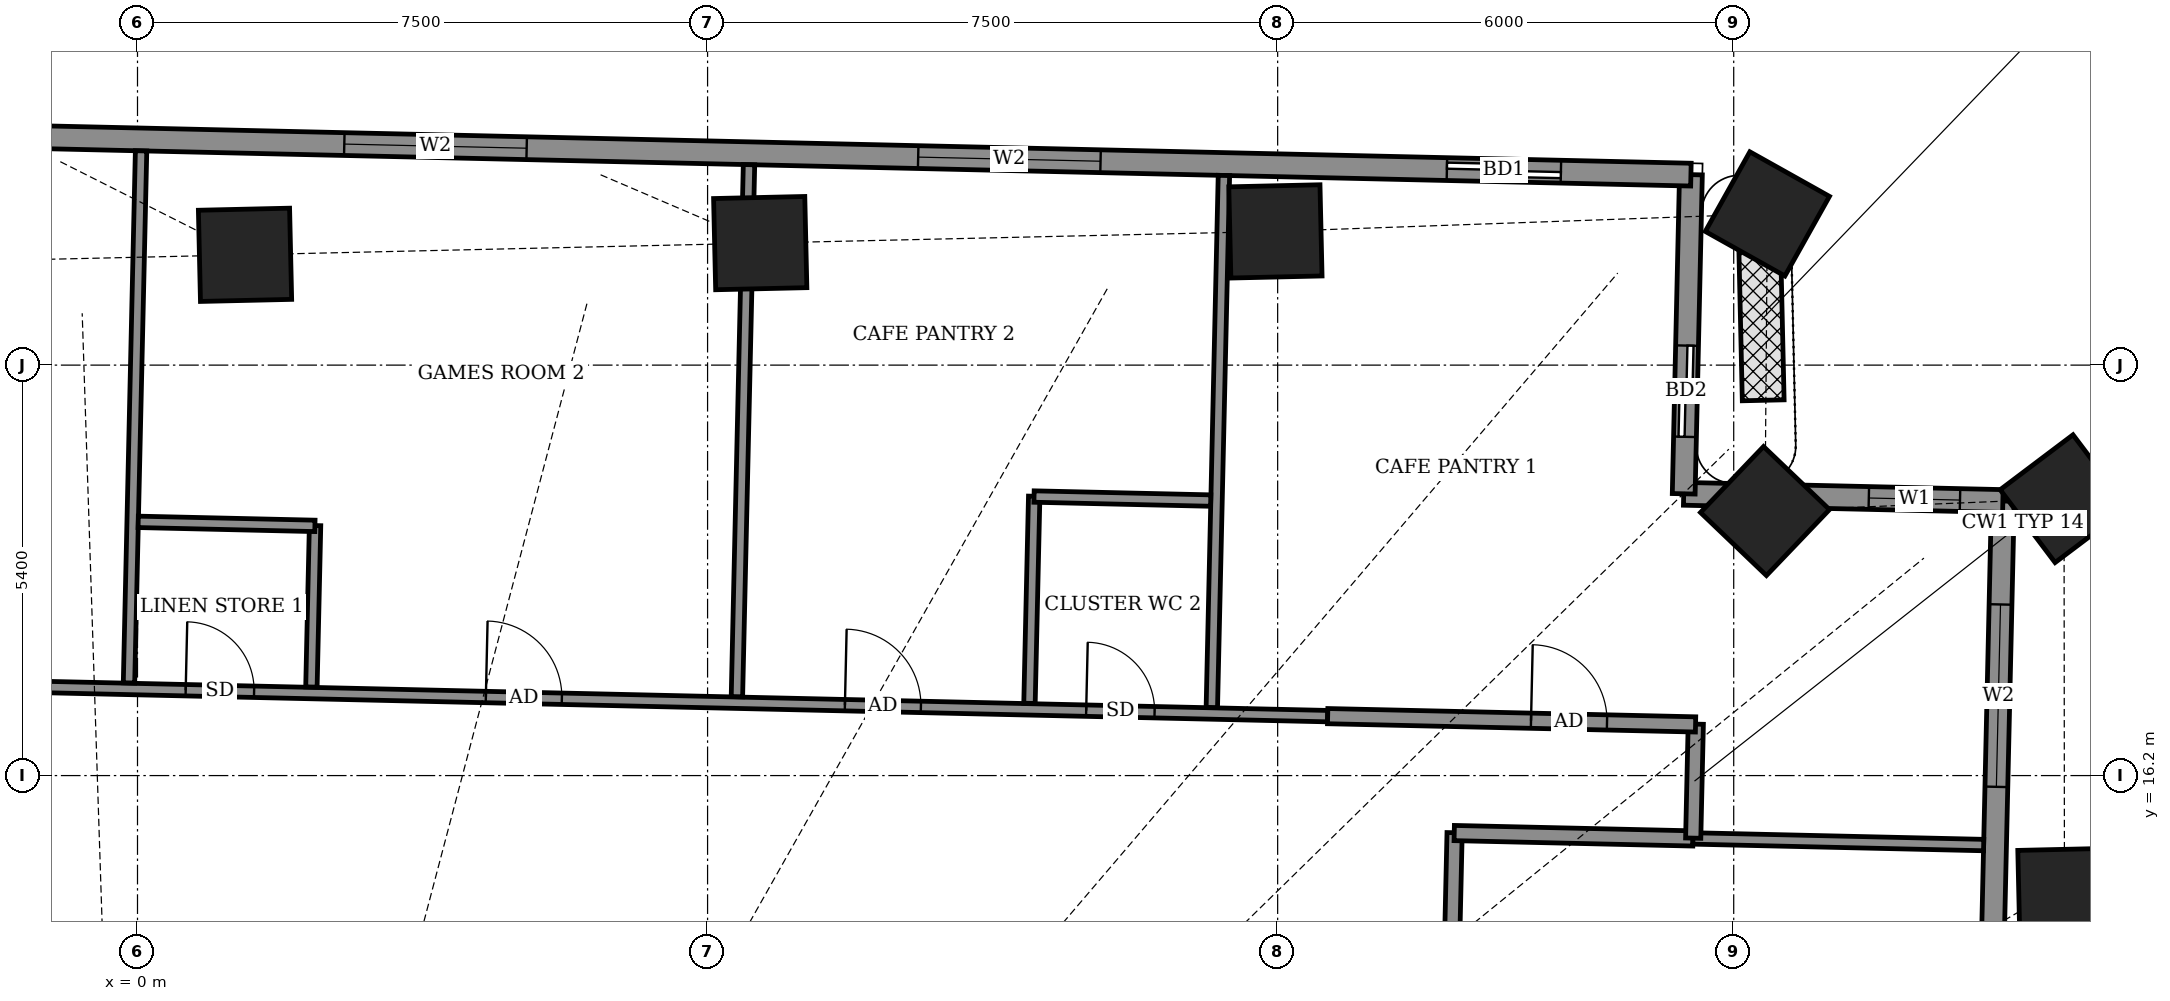
"""IFC4 building model, lengths in metres.
Left out: names, types, materials, properties, quantities, classifications, styles, units other than length and angle.
Written with IfcOpenShell. Run it as: python <this file> out.ifc"""

import sys

from ifc_helpers import new_model, si_unit, direction, frame, frame_2d, origin, origin_2d, place, context, subcontext, project, spatial, rectangle, extrude, element, fill, save


model = new_model("IFC4")
c1 = context("Model", 3, precision=1e-05, world=origin(), true_north=direction((0.0, 1.0)))
c2 = subcontext(c1, "Body", "Model", "MODEL_VIEW")
j1 = project(units=[si_unit("LENGTHUNIT", "METRE"), si_unit("PLANEANGLEUNIT", "RADIAN")], contexts=[c1])
p1 = place(None, origin())
s1 = spatial("IfcSite", under=j1, at=p1, CompositionType="ELEMENT")
p2 = place(p1, origin())
s2 = spatial("IfcBuilding", under=s1, at=p2, CompositionType="ELEMENT")
p3 = place(p2, frame((0.0, 0.0, 193.3)))
s3 = spatial("IfcBuildingStorey", under=s2, at=p3, CompositionType="ELEMENT", Elevation=193.3)
for number, where, z_axis, x_axis in (
    (1, (25.351, 14.629, -0.55), (0.0, 0.0, 1.0), (-0.023, 1.0, 0.0)),
    (2, (25.346, 19.843, -0.55), (0.0, 0.0, 1.0), (-0.602, 0.798, 0.0)),
    (3, (21.411, 19.68, -0.55), (0.0, 0.0, 1.0), (-0.723, 0.691, 0.0)),
    (4, (21.443, 23.589, -0.55), (0.0, 0.0, 1.0), (-0.873, 0.488, 0.0)),
    (5, (14.971, 23.359, -0.55), (0.0, 0.0, 1.0), (-1.0, -0.023, 0.0)),
    (6, (8.193, 23.205, -0.55), (0.0, 0.0, 1.0), (-1.0, -0.023, 0.0)),
    (7, (1.415, 23.051, -0.55), (0.0, 0.0, 1.0), (-1.0, -0.023, 0.0)),
):
    element("IfcColumn", number, at=place(p3, frame(where, z_axis=z_axis, x_axis=x_axis)), inside=s3, PredefinedType="COLUMN", context=c2, shape_type="SweptSolid", body=[
        extrude(rectangle(XDim=1.2, YDim=1.2, at=origin_2d()), origin(), (0.0, 0.0, 1.0), 4.6),
    ])
p4 = place(p3, frame((24.27, 7.885, 0.0), z_axis=(0.0, 0.0, 1.0), x_axis=(0.022715362207, 0.999741972871, 0.0)))
e8 = element("IfcWall", 8, at=p4, inside=s3, PredefinedType="SOLIDWALL", context=c2, shape_type="SweptSolid", body=[
    extrude(rectangle(XDim=11.93, YDim=0.3, at=frame_2d((5.965, 0.0))), origin(), (0.0, 0.0, 1.0), 2.65),
])
p5 = place(p4, frame((3.239, 0.0, 0.0)))
e9 = element("IfcOpeningElement", 9, at=p5, cuts=e8, PredefinedType="OPENING", context=c2, shape_type="SweptSolid", body=[
    extrude(rectangle(XDim=1.5, YDim=2.4, at=frame_2d((0.75, 1.2))), frame((0.0, 0.16, 0.0), z_axis=(0.0, -1.0, 0.0), x_axis=(1.0, 0.0, 0.0)), (0.0, 0.0, 1.0), 0.32),
])
p6 = place(p4, frame((8.169, 0.0, 0.9)))
e10 = element("IfcOpeningElement", 10, at=p6, cuts=e8, PredefinedType="OPENING", context=c2, shape_type="SweptSolid", body=[
    extrude(rectangle(XDim=2.4, YDim=1.5, at=frame_2d((1.2, 0.75))), frame((0.0, 0.16, 0.0), z_axis=(0.0, -1.0, 0.0), x_axis=(1.0, 0.0, 0.0)), (0.0, 0.0, 1.0), 0.32),
])
p7 = place(p3, frame((24.541, 19.812, 0.0), z_axis=(0.0, 0.0, 1.0), x_axis=(-0.999744320311, 0.022611811187, 0.0)))
e11 = element("IfcWall", 11, at=p7, inside=s3, PredefinedType="SOLIDWALL", context=c2, shape_type="SweptSolid", body=[
    extrude(rectangle(XDim=4.2, YDim=0.3, at=frame_2d((2.1, 0.0))), origin(), (0.0, 0.0, 1.0), 2.65),
])
p8 = place(p7, frame((0.564, 0.0, 0.9)))
e12 = element("IfcOpeningElement", 12, at=p8, cuts=e11, PredefinedType="OPENING", context=c2, shape_type="SweptSolid", body=[
    extrude(rectangle(XDim=1.2, YDim=1.5, at=frame_2d((0.6, 0.75))), frame((0.0, 0.16, 0.0), z_axis=(0.0, -1.0, 0.0), x_axis=(1.0, 0.0, 0.0)), (0.0, 0.0, 1.0), 0.32),
])
p9 = place(p3, frame((20.342, 19.907, 0.0), z_axis=(0.0, 0.0, 1.0), x_axis=(0.022611811187, 0.999744320311, 0.0)))
e13 = element("IfcWall", 13, at=p9, inside=s3, PredefinedType="SOLIDWALL", context=c2, shape_type="SweptSolid", body=[
    extrude(rectangle(XDim=4.2, YDim=0.3, at=frame_2d((2.1, 0.0))), origin(), (0.0, 0.0, 1.0), 2.65),
])
p10 = place(p9, frame((0.75, 0.0, 0.0)))
e14 = element("IfcOpeningElement", 14, at=p10, cuts=e13, PredefinedType="OPENING", context=c2, shape_type="SweptSolid", body=[
    extrude(rectangle(XDim=1.2, YDim=2.4, at=frame_2d((0.6, 1.2))), frame((0.0, 0.16, 0.0), z_axis=(0.0, -1.0, 0.0), x_axis=(1.0, 0.0, 0.0)), (0.0, 0.0, 1.0), 0.32),
])
p11 = place(p3, frame((20.437, 24.106, 0.0), z_axis=(0.0, 0.0, 1.0), x_axis=(-0.999742506232, 0.022691875925, 0.0)))
e15 = element("IfcWall", 15, at=p11, inside=s3, PredefinedType="SOLIDWALL", context=c2, shape_type="SweptSolid", body=[
    extrude(rectangle(XDim=42.444, YDim=0.3, at=frame_2d((21.222, 0.0))), origin(), (0.0, 0.0, 1.0), 2.65),
])
p12 = place(p11, frame((1.711, 0.0, 0.0)))
e16 = element("IfcOpeningElement", 16, at=p12, cuts=e15, PredefinedType="OPENING", context=c2, shape_type="SweptSolid", body=[
    extrude(rectangle(XDim=1.5, YDim=2.4, at=frame_2d((0.75, 1.2))), frame((0.0, 0.16, 0.0), z_axis=(0.0, -1.0, 0.0), x_axis=(1.0, 0.0, 0.0)), (0.0, 0.0, 1.0), 0.32),
])
p13 = place(p11, frame((7.769, 0.0, 0.9)))
e17 = element("IfcOpeningElement", 17, at=p13, cuts=e15, PredefinedType="OPENING", context=c2, shape_type="SweptSolid", body=[
    extrude(rectangle(XDim=2.4, YDim=1.5, at=frame_2d((1.2, 0.75))), frame((0.0, 0.16, 0.0), z_axis=(0.0, -1.0, 0.0), x_axis=(1.0, 0.0, 0.0)), (0.0, 0.0, 1.0), 0.32),
])
p14 = place(p11, frame((15.321, 0.0, 0.9)))
e18 = element("IfcOpeningElement", 18, at=p14, cuts=e15, PredefinedType="OPENING", context=c2, shape_type="SweptSolid", body=[
    extrude(rectangle(XDim=2.4, YDim=1.5, at=frame_2d((1.2, 0.75))), frame((0.0, 0.16, 0.0), z_axis=(0.0, -1.0, 0.0), x_axis=(1.0, 0.0, 0.0)), (0.0, 0.0, 1.0), 0.32),
])
p15 = place(p11, frame((22.142, 0.0, 0.0)))
e19 = element("IfcOpeningElement", 19, at=p15, cuts=e15, PredefinedType="OPENING", context=c2, shape_type="SweptSolid", body=[
    extrude(rectangle(XDim=1.5, YDim=2.4, at=frame_2d((0.75, 1.2))), frame((0.0, 0.16, 0.0), z_axis=(0.0, -1.0, 0.0), x_axis=(1.0, 0.0, 0.0)), (0.0, 0.0, 1.0), 0.32),
])
p16 = place(p11, frame((29.444, 0.0, 0.9)))
e20 = element("IfcOpeningElement", 20, at=p16, cuts=e15, PredefinedType="OPENING", context=c2, shape_type="SweptSolid", body=[
    extrude(rectangle(XDim=2.4, YDim=1.5, at=frame_2d((1.2, 0.75))), frame((0.0, 0.16, 0.0), z_axis=(0.0, -1.0, 0.0), x_axis=(1.0, 0.0, 0.0)), (0.0, 0.0, 1.0), 0.32),
])
p17 = place(p11, frame((37.419, 0.0, 0.9)))
e21 = element("IfcOpeningElement", 21, at=p17, cuts=e15, PredefinedType="OPENING", context=c2, shape_type="SweptSolid", body=[
    extrude(rectangle(XDim=2.4, YDim=1.5, at=frame_2d((1.2, 0.75))), frame((0.0, 0.16, 0.0), z_axis=(0.0, -1.0, 0.0), x_axis=(1.0, 0.0, 0.0)), (0.0, 0.0, 1.0), 0.32),
])
p18 = place(p3, frame((21.34, 23.253, 0.0), z_axis=(0.0, 0.0, 1.0), x_axis=(0.022608734328, -0.999744389898, 0.0)))
e22 = element("IfcWall", 22, at=p18, inside=s3, PredefinedType="USERDEFINED", context=c2, shape_type="SweptSolid", body=[
    extrude(rectangle(XDim=2.116, YDim=0.55, at=frame_2d((1.058, 0.0))), origin(), (0.0, 0.0, 1.0), 0.8),
])
p19 = place(p3, frame((17.154, 7.786, 0.0), z_axis=(0.0, 0.0, 1.0), x_axis=(0.022680883318, 0.999742755679, 0.0)))
e23 = element("IfcWall", 23, at=p19, inside=s3, PredefinedType="PARTITIONING", context=c2, shape_type="SweptSolid", body=[
    extrude(rectangle(XDim=7.664, YDim=0.2, at=frame_2d((3.832, 0.0))), origin(), (0.0, 0.0, 1.0), 2.75),
])
p20 = place(p19, frame((3.434, 0.0, 0.0)))
e24 = element("IfcOpeningElement", 24, at=p20, cuts=e23, PredefinedType="OPENING", context=c2, shape_type="SweptSolid", body=[
    extrude(rectangle(XDim=1.0, YDim=2.1, at=frame_2d((0.5, 1.05))), frame((0.0, 0.11, 0.0), z_axis=(0.0, -1.0, 0.0), x_axis=(1.0, 0.0, 0.0)), (0.0, 0.0, 1.0), 0.22),
])
p21 = place(p3, frame((17.323, 15.444, 0.0), z_axis=(0.0, 0.0, 1.0), x_axis=(0.999744316737, -0.022611969234, 0.0)))
e25 = element("IfcWall", 25, at=p21, inside=s3, PredefinedType="PARTITIONING", context=c2, shape_type="SweptSolid", body=[
    extrude(rectangle(XDim=3.142, YDim=0.2, at=frame_2d((1.571, 0.0))), origin(), (0.0, 0.0, 1.0), 2.85),
])
p22 = place(p3, frame((20.464, 15.373, 0.0), z_axis=(0.0, 0.0, 1.0), x_axis=(0.999740350573, -0.022786650396, 0.0)))
e26 = element("IfcWall", 26, at=p22, inside=s3, PredefinedType="PARTITIONING", context=c2, shape_type="SweptSolid", body=[
    extrude(rectangle(XDim=3.825, YDim=0.15, at=frame_2d((1.913, 0.0))), origin(), (0.0, 0.0, 1.0), 4.05),
])
p23 = place(p3, frame((20.467, 15.377, 0.0), z_axis=(0.0, 0.0, 1.0), x_axis=(0.022617910375, 0.999744182344, 0.0)))
e27 = element("IfcWall", 27, at=p23, inside=s3, PredefinedType="PARTITIONING", context=c2, shape_type="SweptSolid", body=[
    extrude(rectangle(XDim=1.5, YDim=0.2, at=frame_2d((0.75, 0.0))), origin(), (0.0, 0.0, 1.0), 2.85),
])
p24 = place(p3, frame((-14.871, 17.675, 0.0), z_axis=(0.0, 0.0, 1.0), x_axis=(0.999742359486, -0.02269834024, 0.0)))
e28 = element("IfcWall", 28, at=p24, inside=s3, PredefinedType="PARTITIONING", context=c2, shape_type="SweptSolid", body=[
    extrude(rectangle(XDim=30.536, YDim=0.15, at=frame_2d((15.268, 0.0))), origin(), (0.0, 0.0, 1.0), 2.55),
])
p25 = place(p24, frame((24.184, 0.0, 0.0)))
e29 = element("IfcOpeningElement", 29, at=p25, cuts=e28, PredefinedType="OPENING", context=c2, shape_type="SweptSolid", body=[
    extrude(rectangle(XDim=1.0, YDim=2.1, at=frame_2d((0.5, 1.05))), frame((0.0, 0.085, 0.0), z_axis=(0.0, -1.0, 0.0), x_axis=(1.0, 0.0, 0.0)), (0.0, 0.0, 1.0), 0.17),
])
p26 = place(p24, frame((27.359, 0.0, 0.0)))
e30 = element("IfcOpeningElement", 30, at=p26, cuts=e28, PredefinedType="OPENING", context=c2, shape_type="SweptSolid", body=[
    extrude(rectangle(XDim=0.9, YDim=2.1, at=frame_2d((0.45, 1.05))), frame((0.0, 0.085, 0.0), z_axis=(0.0, -1.0, 0.0), x_axis=(1.0, 0.0, 0.0)), (0.0, 0.0, 1.0), 0.17),
])
p27 = place(p24, frame((19.459, 0.0, 0.0)))
e31 = element("IfcOpeningElement", 31, at=p27, cuts=e28, PredefinedType="OPENING", context=c2, shape_type="SweptSolid", body=[
    extrude(rectangle(XDim=1.0, YDim=2.1, at=frame_2d((0.5, 1.05))), frame((0.0, 0.085, 0.0), z_axis=(0.0, -1.0, 0.0), x_axis=(1.0, 0.0, 0.0)), (0.0, 0.0, 1.0), 0.17),
])
p28 = place(p24, frame((15.509, 0.0, 0.0)))
e32 = element("IfcOpeningElement", 32, at=p28, cuts=e28, PredefinedType="OPENING", context=c2, shape_type="SweptSolid", body=[
    extrude(rectangle(XDim=0.9, YDim=2.1, at=frame_2d((0.45, 1.05))), frame((0.0, 0.085, 0.0), z_axis=(0.0, -1.0, 0.0), x_axis=(1.0, 0.0, 0.0)), (0.0, 0.0, 1.0), 0.17),
])
p29 = place(p24, frame((11.134, 0.0, 0.0)))
e33 = element("IfcOpeningElement", 33, at=p29, cuts=e28, PredefinedType="OPENING", context=c2, shape_type="SweptSolid", body=[
    extrude(rectangle(XDim=1.0, YDim=2.1, at=frame_2d((0.5, 1.05))), frame((0.0, 0.085, 0.0), z_axis=(0.0, -1.0, 0.0), x_axis=(1.0, 0.0, 0.0)), (0.0, 0.0, 1.0), 0.17),
])
p30 = place(p24, frame((5.209, 0.0, 0.0)))
e34 = element("IfcOpeningElement", 34, at=p30, cuts=e28, PredefinedType="OPENING", context=c2, shape_type="SweptSolid", body=[
    extrude(rectangle(XDim=1.0, YDim=2.1, at=frame_2d((0.5, 1.05))), frame((0.0, 0.085, 0.0), z_axis=(0.0, -1.0, 0.0), x_axis=(1.0, 0.0, 0.0)), (0.0, 0.0, 1.0), 0.17),
])
p31 = place(p24, frame((1.259, 0.0, 0.0)))
e35 = element("IfcOpeningElement", 35, at=p31, cuts=e28, PredefinedType="OPENING", context=c2, shape_type="SweptSolid", body=[
    extrude(rectangle(XDim=0.9, YDim=2.1, at=frame_2d((0.45, 1.05))), frame((0.0, 0.085, 0.0), z_axis=(0.0, -1.0, 0.0), x_axis=(1.0, 0.0, 0.0)), (0.0, 0.0, 1.0), 0.17),
])
p32 = place(p3, frame((15.658, 16.982, 0.0), z_axis=(0.0, 0.0, 1.0), x_axis=(0.999747041942, -0.022491156656, 0.0)))
e36 = element("IfcWall", 36, at=p32, inside=s3, PredefinedType="PARTITIONING", context=c2, shape_type="SweptSolid", body=[
    extrude(rectangle(XDim=4.841, YDim=0.2, at=frame_2d((2.421, 0.0))), origin(), (0.0, 0.0, 1.0), 2.75),
])
p33 = place(p32, frame((2.676, 0.0, 0.0)))
e37 = element("IfcOpeningElement", 37, at=p33, cuts=e36, PredefinedType="OPENING", context=c2, shape_type="SweptSolid", body=[
    extrude(rectangle(XDim=1.0, YDim=2.1, at=frame_2d((0.5, 1.05))), frame((0.0, 0.11, 0.0), z_axis=(0.0, -1.0, 0.0), x_axis=(1.0, 0.0, 0.0)), (0.0, 0.0, 1.0), 0.22),
])
p34 = place(p3, frame((-0.112, 17.419, 0.0), z_axis=(0.0, 0.0, 1.0), x_axis=(0.022734078158, 0.999741547446, 0.0)))
e38 = element("IfcWall", 38, at=p34, inside=s3, PredefinedType="PARTITIONING", context=c2, shape_type="SweptSolid", body=[
    extrude(rectangle(XDim=7.002, YDim=0.15, at=frame_2d((3.501, 0.0))), origin(), (0.0, 0.0, 1.0), 2.65),
])
p35 = place(p3, frame((2.288, 17.365, 0.0), z_axis=(0.0, 0.0, 1.0), x_axis=(0.022523020646, 0.999746324595, 0.0)))
e39 = element("IfcWall", 39, at=p35, inside=s3, PredefinedType="PARTITIONING", context=c2, shape_type="SweptSolid", body=[
    extrude(rectangle(XDim=2.125, YDim=0.15, at=frame_2d((1.062, 0.0))), origin(), (0.0, 0.0, 1.0), 4.05),
])
p36 = place(p3, frame((7.886, 17.238, 0.0), z_axis=(0.0, 0.0, 1.0), x_axis=(0.022702393474, 0.999742267452, 0.0)))
e40 = element("IfcWall", 40, at=p36, inside=s3, PredefinedType="PARTITIONING", context=c2, shape_type="SweptSolid", body=[
    extrude(rectangle(XDim=7.001, YDim=0.15, at=frame_2d((3.5, 0.0))), origin(), (0.0, 0.0, 1.0), 2.85),
])
p37 = place(p3, frame((11.735, 17.15, 0.0), z_axis=(0.0, 0.0, 1.0), x_axis=(0.022749889061, 0.999741187782, 0.0)))
e41 = element("IfcWall", 41, at=p37, inside=s3, PredefinedType="PARTITIONING", context=c2, shape_type="SweptSolid", body=[
    extrude(rectangle(XDim=2.726, YDim=0.15, at=frame_2d((1.363, 0.0))), origin(), (0.0, 0.0, 1.0), 2.75),
])
p38 = place(p3, frame((14.134, 17.096, 0.0), z_axis=(0.0, 0.0, 1.0), x_axis=(0.022702393474, 0.999742267452, 0.0)))
e42 = element("IfcWall", 42, at=p38, inside=s3, PredefinedType="PARTITIONING", context=c2, shape_type="SweptSolid", body=[
    extrude(rectangle(XDim=7.001, YDim=0.15, at=frame_2d((3.5, 0.0))), origin(), (0.0, 0.0, 1.0), 2.55),
])
p39 = place(p3, frame((0.009, 19.538, 0.0), z_axis=(0.0, 0.0, 1.0), x_axis=(0.999740478815, -0.022781023197, 0.0)))
e43 = element("IfcWall", 43, at=p39, inside=s3, PredefinedType="PARTITIONING", context=c2, shape_type="SweptSolid", body=[
    extrude(rectangle(XDim=2.325, YDim=0.15, at=frame_2d((1.163, 0.0))), origin(), (0.0, 0.0, 1.0), 2.85),
])
p40 = place(p3, frame((11.795, 19.871, 0.0), z_axis=(0.0, 0.0, 1.0), x_axis=(0.999740260747, -0.02279059109, 0.0)))
e44 = element("IfcWall", 44, at=p40, inside=s3, PredefinedType="PARTITIONING", context=c2, shape_type="SweptSolid", body=[
    extrude(rectangle(XDim=2.324, YDim=0.15, at=frame_2d((1.162, 0.0))), origin(), (0.0, 0.0, 1.0), 2.75),
])
p41 = place(p6, origin())
e45 = element("IfcWindow", 45, at=p41, inside=s3, PartitioningType="DOUBLE_PANEL_VERTICAL", PredefinedType="WINDOW", context=c2, shape_type="SweptSolid", body=[
    extrude(rectangle(XDim=2.4, YDim=1.5, at=frame_2d((1.2, 0.75))), frame((0.0, 0.03, 0.0), z_axis=(0.0, -1.0, 0.0), x_axis=(1.0, 0.0, 0.0)), (0.0, 0.0, 1.0), 0.06),
])
fill(e10, e45)
p42 = place(p8, origin())
e46 = element("IfcWindow", 46, at=p42, inside=s3, PartitioningType="SINGLE_PANEL", PredefinedType="WINDOW", context=c2, shape_type="SweptSolid", body=[
    extrude(rectangle(XDim=1.2, YDim=1.5, at=frame_2d((0.6, 0.75))), frame((0.0, 0.03, 0.0), z_axis=(0.0, -1.0, 0.0), x_axis=(1.0, 0.0, 0.0)), (0.0, 0.0, 1.0), 0.06),
])
fill(e12, e46)
p43 = place(p10, origin())
e47 = element("IfcDoor", 47, at=p43, inside=s3, OperationType="SLIDING_TO_LEFT", PredefinedType="DOOR", context=c2, shape_type="SweptSolid", body=[
    extrude(rectangle(XDim=1.2, YDim=2.4, at=frame_2d((0.6, 1.2))), frame((0.0, 0.025, 0.0), z_axis=(0.0, -1.0, 0.0), x_axis=(1.0, 0.0, 0.0)), (0.0, 0.0, 1.0), 0.05),
])
fill(e14, e47)
p44 = place(p12, origin())
e48 = element("IfcDoor", 48, at=p44, inside=s3, OperationType="SLIDING_TO_LEFT", PredefinedType="DOOR", context=c2, shape_type="SweptSolid", body=[
    extrude(rectangle(XDim=1.5, YDim=2.4, at=frame_2d((0.75, 1.2))), frame((0.0, 0.025, 0.0), z_axis=(0.0, -1.0, 0.0), x_axis=(1.0, 0.0, 0.0)), (0.0, 0.0, 1.0), 0.05),
])
fill(e16, e48)
p45 = place(p13, origin())
e49 = element("IfcWindow", 49, at=p45, inside=s3, PartitioningType="DOUBLE_PANEL_VERTICAL", PredefinedType="WINDOW", context=c2, shape_type="SweptSolid", body=[
    extrude(rectangle(XDim=2.4, YDim=1.5, at=frame_2d((1.2, 0.75))), frame((0.0, 0.03, 0.0), z_axis=(0.0, -1.0, 0.0), x_axis=(1.0, 0.0, 0.0)), (0.0, 0.0, 1.0), 0.06),
])
fill(e17, e49)
p46 = place(p14, origin())
e50 = element("IfcWindow", 50, at=p46, inside=s3, PartitioningType="DOUBLE_PANEL_VERTICAL", PredefinedType="WINDOW", context=c2, shape_type="SweptSolid", body=[
    extrude(rectangle(XDim=2.4, YDim=1.5, at=frame_2d((1.2, 0.75))), frame((0.0, 0.03, 0.0), z_axis=(0.0, -1.0, 0.0), x_axis=(1.0, 0.0, 0.0)), (0.0, 0.0, 1.0), 0.06),
])
fill(e18, e50)
p47 = place(p33, origin())
e51 = element("IfcDoor", 51, at=p47, inside=s3, OperationType="SINGLE_SWING_RIGHT", PredefinedType="DOOR", context=c2, shape_type="SweptSolid", body=[
    extrude(rectangle(XDim=1.0, YDim=2.1, at=frame_2d((0.5, 1.05))), frame((0.0, 0.025, 0.0), z_axis=(0.0, -1.0, 0.0), x_axis=(1.0, 0.0, 0.0)), (0.0, 0.0, 1.0), 0.05),
])
fill(e37, e51)
p48 = place(p25, origin())
e52 = element("IfcDoor", 52, at=p48, inside=s3, OperationType="SINGLE_SWING_LEFT", PredefinedType="DOOR", context=c2, shape_type="SweptSolid", body=[
    extrude(rectangle(XDim=1.0, YDim=2.1, at=frame_2d((0.5, 1.05))), frame((0.0, 0.025, 0.0), z_axis=(0.0, -1.0, 0.0), x_axis=(1.0, 0.0, 0.0)), (0.0, 0.0, 1.0), 0.05),
])
fill(e29, e52)
p49 = place(p26, origin())
e53 = element("IfcDoor", 53, at=p49, inside=s3, OperationType="SINGLE_SWING_LEFT", PredefinedType="DOOR", context=c2, shape_type="SweptSolid", body=[
    extrude(rectangle(XDim=0.9, YDim=2.1, at=frame_2d((0.45, 1.05))), frame((0.0, 0.025, 0.0), z_axis=(0.0, -1.0, 0.0), x_axis=(1.0, 0.0, 0.0)), (0.0, 0.0, 1.0), 0.05),
])
fill(e30, e53)
p50 = place(p27, origin())
e54 = element("IfcDoor", 54, at=p50, inside=s3, OperationType="SINGLE_SWING_RIGHT", PredefinedType="DOOR", context=c2, shape_type="SweptSolid", body=[
    extrude(rectangle(XDim=1.0, YDim=2.1, at=frame_2d((0.5, 1.05))), frame((0.0, 0.025, 0.0), z_axis=(0.0, -1.0, 0.0), x_axis=(1.0, 0.0, 0.0)), (0.0, 0.0, 1.0), 0.05),
])
fill(e31, e54)
p51 = place(p28, origin())
e55 = element("IfcDoor", 55, at=p51, inside=s3, OperationType="SINGLE_SWING_RIGHT", PredefinedType="DOOR", context=c2, shape_type="SweptSolid", body=[
    extrude(rectangle(XDim=0.9, YDim=2.1, at=frame_2d((0.45, 1.05))), frame((0.0, 0.025, 0.0), z_axis=(0.0, -1.0, 0.0), x_axis=(1.0, 0.0, 0.0)), (0.0, 0.0, 1.0), 0.05),
])
fill(e32, e55)
save(model, sys.argv[1])
